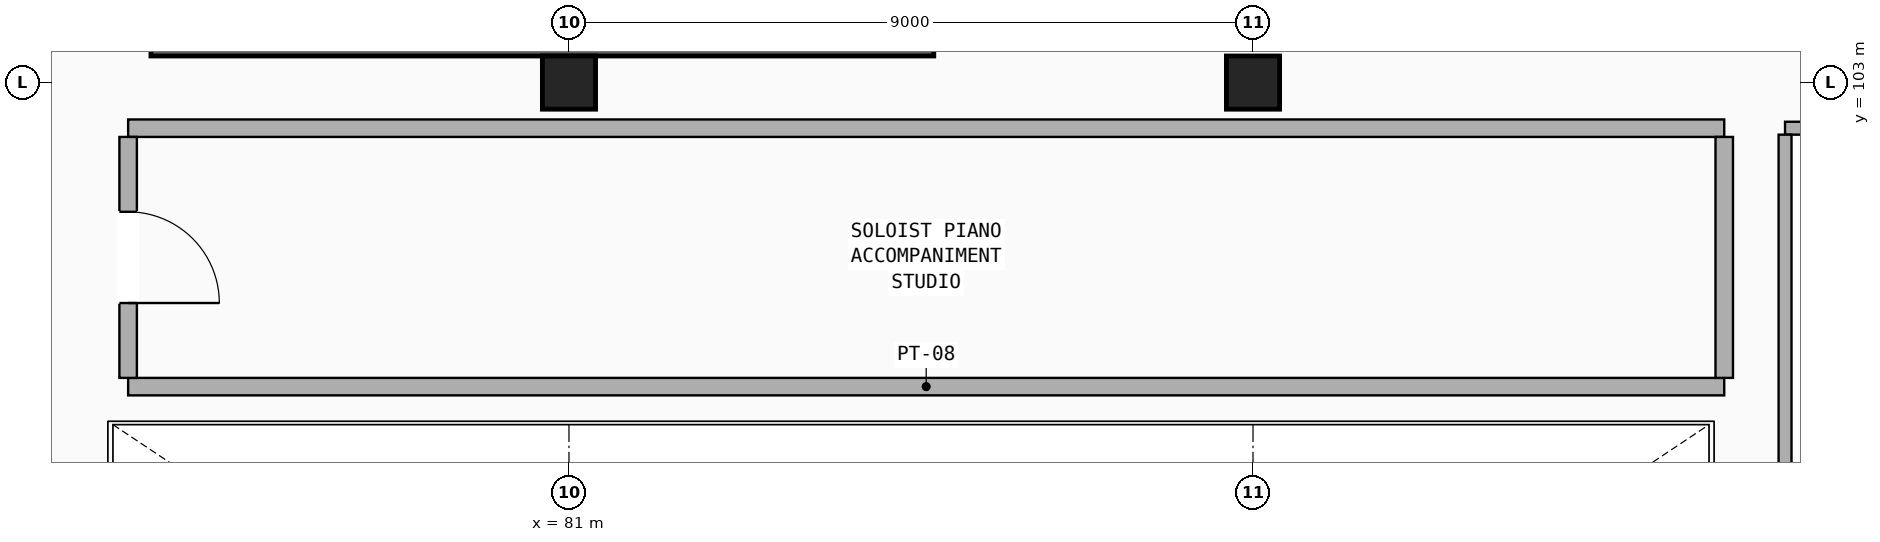
"""IFC4 building model, lengths in metres.
Left out: names, types, materials, properties, quantities, classifications, styles, units other than length and angle.
Written with IfcOpenShell. Run it as: python <this file> out.ifc"""

import sys

from ifc_helpers import new_model, si_unit, direction, frame, frame_2d, origin, origin_2d, place, context, subcontext, project, spatial, rectangle, extrude, element, fill, save


model = new_model("IFC4")
c1 = context("Model", 3, precision=1e-05, world=origin(), true_north=direction((0.0, 1.0)))
c2 = subcontext(c1, "Body", "Model", "MODEL_VIEW")
j1 = project(units=[si_unit("LENGTHUNIT", "METRE"), si_unit("PLANEANGLEUNIT", "RADIAN")], contexts=[c1])
p1 = place(None, origin())
s1 = spatial("IfcSite", under=j1, at=p1, CompositionType="ELEMENT")
p2 = place(p1, origin())
s2 = spatial("IfcBuilding", under=s1, at=p2, CompositionType="ELEMENT")
p3 = place(p2, frame((0.0, 0.0, 9.52)))
s3 = spatial("IfcBuildingStorey", under=s2, at=p3, CompositionType="ELEMENT", Elevation=9.52)
for number, where, z_axis, x_axis in (
    (1, (81.0, 103.0, 0.0), (0.0, 0.0, 1.0), (1.0, 0.0, 0.0)),
    (2, (90.0, 103.0, 0.0), (0.0, 0.0, 1.0), (1.0, 0.0, 0.0)),
):
    element("IfcColumn", number, at=place(p3, frame(where, z_axis=z_axis, x_axis=x_axis)), inside=s3, PredefinedType="COLUMN", context=c2, shape_type="SweptSolid", body=[
        extrude(rectangle(XDim=0.7, YDim=0.7, at=origin_2d()), origin(), (0.0, 0.0, 1.0), 4.08),
    ])
p4 = place(p3, frame((75.5, 103.5, 0.0), z_axis=(0.0, 0.0, 1.0), x_axis=(1.0, 0.0, 0.0)))
e3 = element("IfcWall", 3, at=p4, inside=s3, PredefinedType="SHEAR", context=c2, shape_type="SweptSolid", body=[
    extrude(rectangle(XDim=10.3, YDim=0.3, at=frame_2d((5.15, 0.0))), origin(), (0.0, 0.0, 1.0), 4.08),
])
p5 = place(p3, frame((97.0, 102.4, 0.0), z_axis=(0.0, 0.0, 1.0), x_axis=(1.0, 0.0, 0.0)))
e4 = element("IfcWall", 4, at=p5, inside=s3, PredefinedType="PARTITIONING", context=c2, shape_type="SweptSolid", body=[
    extrude(rectangle(XDim=19.4, YDim=0.17, at=frame_2d((9.7, 0.0))), origin(), (0.0, 0.0, 1.0), 2.97),
])
p6 = place(p3, frame((97.0, 82.085, 0.0), z_axis=(0.0, 0.0, 1.0), x_axis=(0.0, 1.0, 0.0)))
e5 = element("IfcWall", 5, at=p6, inside=s3, PredefinedType="PARTITIONING", context=c2, shape_type="SweptSolid", body=[
    extrude(rectangle(XDim=20.23, YDim=0.17, at=frame_2d((10.115, 0.0))), origin(), (0.0, 0.0, 1.0), 2.82),
])
for number, where, z_axis, x_axis in (
    (6, (75.2, 99.0, 0.0), (0.0, 0.0, 1.0), (1.0, 0.0, 0.0)),
    (7, (75.2, 102.4, 0.0), (0.0, 0.0, 1.0), (1.0, 0.0, 0.0)),
):
    element("IfcWall", number, at=place(p3, frame(where, z_axis=z_axis, x_axis=x_axis)), inside=s3, PredefinedType="PARTITIONING", context=c2, shape_type="SweptSolid", body=[
        extrude(rectangle(XDim=21.0, YDim=0.23, at=frame_2d((10.5, 0.0))), origin(), (0.0, 0.0, 1.0), 3.12),
    ])
p7 = place(p3, frame((75.2, 99.115, 0.0), z_axis=(0.0, 0.0, 1.0), x_axis=(0.0, 1.0, 0.0)))
e8 = element("IfcWall", 8, at=p7, inside=s3, PredefinedType="PARTITIONING", context=c2, shape_type="SweptSolid", body=[
    extrude(rectangle(XDim=3.17, YDim=0.23, at=frame_2d((1.585, 0.0))), origin(), (0.0, 0.0, 1.0), 3.84),
])
p8 = place(p7, frame((0.985, 0.0, 0.0)))
e9 = element("IfcOpeningElement", 9, at=p8, cuts=e8, PredefinedType="OPENING", context=c2, shape_type="SweptSolid", body=[
    extrude(rectangle(XDim=1.2, YDim=2.2, at=frame_2d((0.6, 1.1))), frame((0.0, 0.125, 0.0), z_axis=(0.0, -1.0, 0.0), x_axis=(1.0, 0.0, 0.0)), (0.0, 0.0, 1.0), 0.25),
])
p9 = place(p3, frame((96.2, 99.115, 0.0), z_axis=(0.0, 0.0, 1.0), x_axis=(0.0, 1.0, 0.0)))
e10 = element("IfcWall", 10, at=p9, inside=s3, PredefinedType="PARTITIONING", context=c2, shape_type="SweptSolid", body=[
    extrude(rectangle(XDim=3.17, YDim=0.23, at=frame_2d((1.585, 0.0))), origin(), (0.0, 0.0, 1.0), 3.84),
])
p10 = place(p8, frame((1.2, 0.0, 0.0), z_axis=(0.0, 0.0, 1.0), x_axis=(-1.0, 0.0, 0.0)))
e11 = element("IfcDoor", 11, at=p10, inside=s3, OperationType="SINGLE_SWING_RIGHT", PredefinedType="DOOR", context=c2, shape_type="SweptSolid", body=[
    extrude(rectangle(XDim=1.2, YDim=2.2, at=frame_2d((0.6, 1.1))), frame((0.0, 0.025, 0.0), z_axis=(0.0, -1.0, 0.0), x_axis=(1.0, 0.0, 0.0)), (0.0, 0.0, 1.0), 0.05),
])
fill(e9, e11)
save(model, sys.argv[1])
